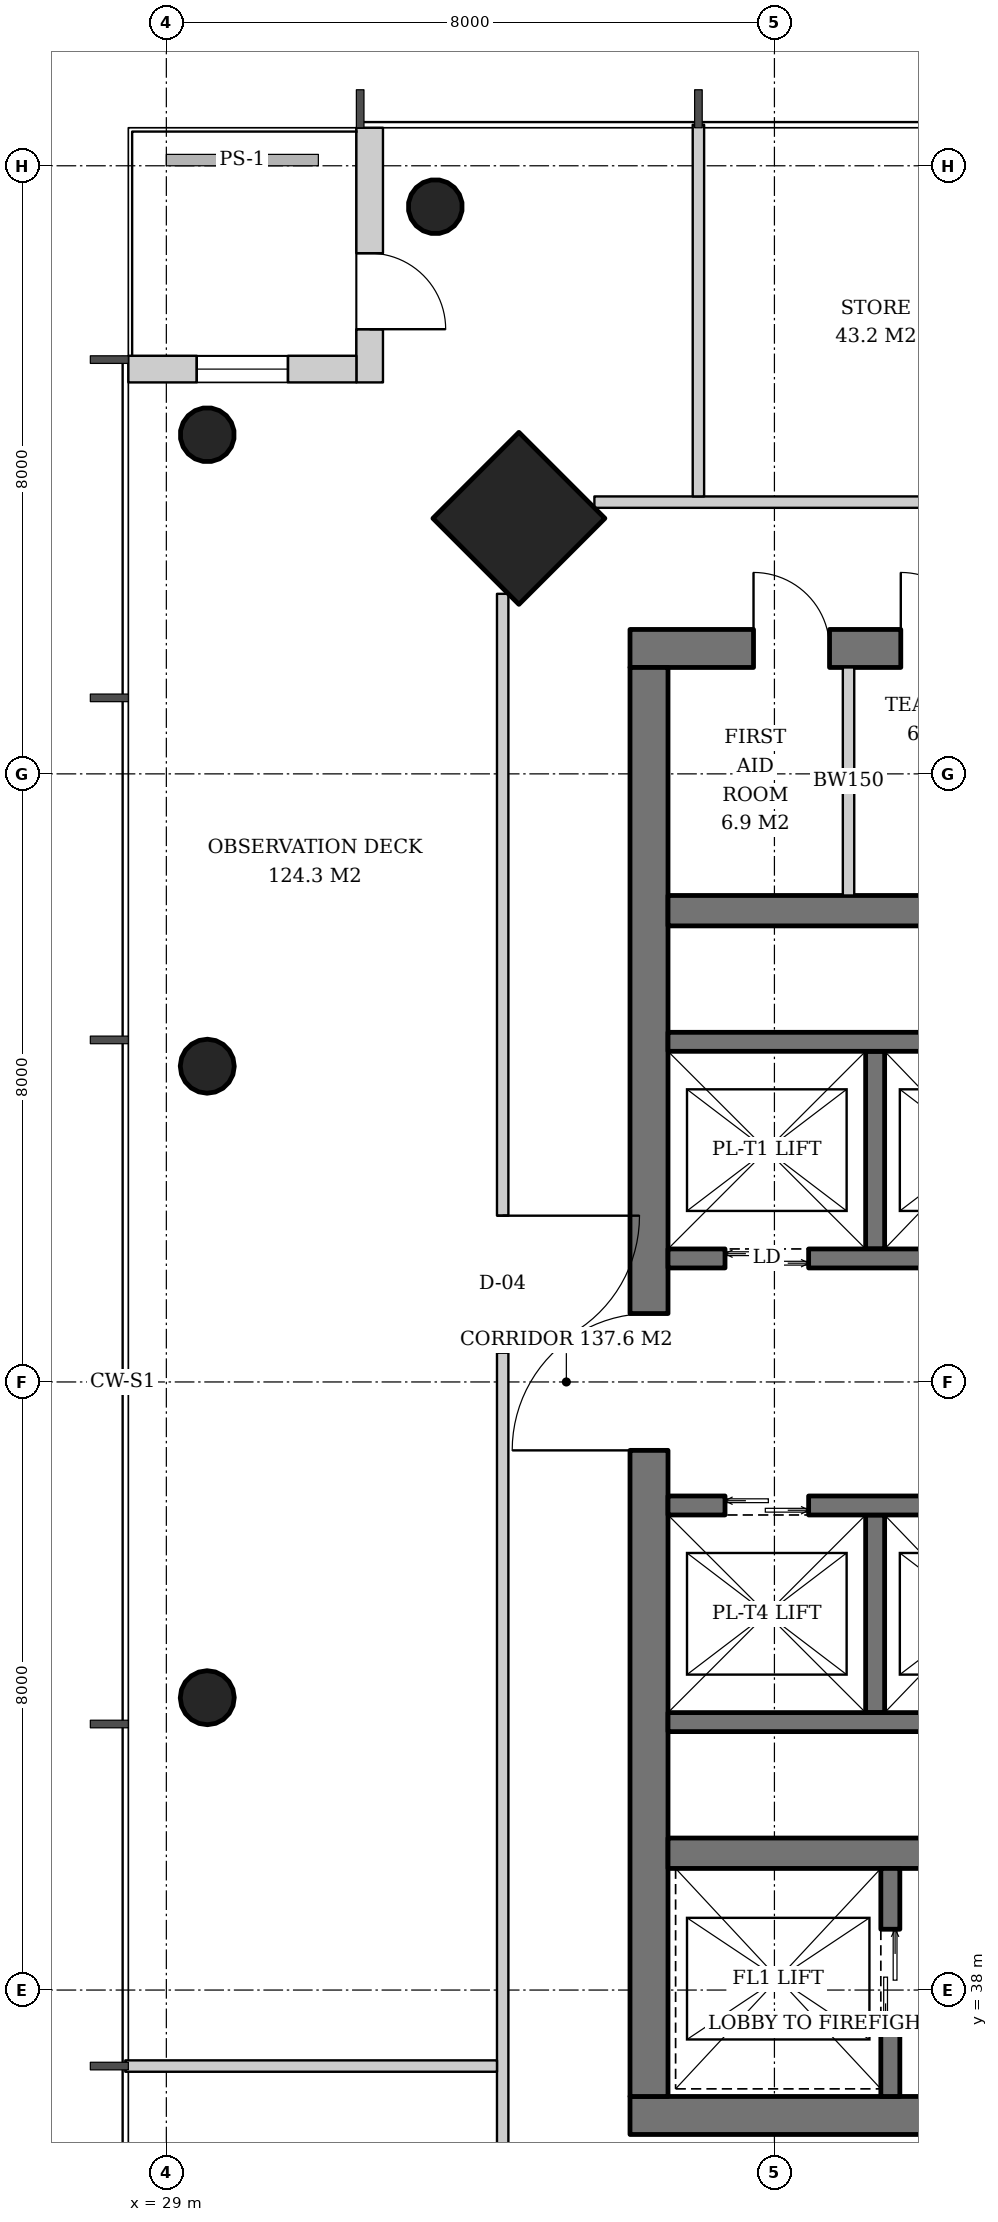
"""IFC4 building model, lengths in metres.
Left out: names, types, materials, properties, quantities, classifications, styles, units other than length and angle.
Written with IfcOpenShell. Run it as: python <this file> out.ifc"""

import sys

from ifc_helpers import new_model, si_unit, direction, frame, frame_2d, origin, origin_2d, place, context, subcontext, project, spatial, rectangle, hollow_circle, extrude, element, fill, save


model = new_model("IFC4")
c1 = context("Model", 3, precision=1e-05, world=origin(), true_north=direction((0.0, 1.0)))
c2 = subcontext(c1, "Body", "Model", "MODEL_VIEW")
j1 = project(units=[si_unit("LENGTHUNIT", "METRE"), si_unit("PLANEANGLEUNIT", "RADIAN")], contexts=[c1])
p1 = place(None, origin())
s1 = spatial("IfcSite", under=j1, at=p1, CompositionType="ELEMENT")
p2 = place(p1, origin())
s2 = spatial("IfcBuilding", under=s1, at=p2, CompositionType="ELEMENT")
p3 = place(p2, frame((0.0, 0.0, 287.0)))
s3 = spatial("IfcBuildingStorey", under=s2, at=p3, CompositionType="ELEMENT", Elevation=287.0)
p4 = place(p3, frame((33.6, 57.4, 0.0), z_axis=(0.031898107953, -0.031898107953, 0.998981992539), x_axis=(0.707106781187, 0.707106781187, 0.0)))
e1 = element("IfcColumn", 1, at=p4, inside=s3, PredefinedType="COLUMN", context=c2, shape_type="SweptSolid", body=[
    extrude(rectangle(XDim=1.6, YDim=1.6, at=origin_2d()), origin(), (0.0, 0.0, 1.0), 3.804),
])
for number, where, z_axis, x_axis in (
    (2, (32.5, 61.5, 0.0), (0.032, -0.032, 0.999), (0.707, 0.707, 0.0)),
    (3, (29.5, 58.5, 0.0), (0.032, -0.032, 0.999), (0.707, 0.707, 0.0)),
):
    element("IfcColumn", number, at=place(p3, frame(where, z_axis=z_axis, x_axis=x_axis)), inside=s3, PredefinedType="COLUMN", context=c2, shape_type="SweptSolid", body=[
        extrude(hollow_circle(Radius=0.355, WallThickness=0.025, at=origin_2d()), origin(), (0.0, 0.0, 1.0), 3.804),
    ])
for number, where, z_axis, x_axis in (
    (4, (29.5, 50.167, 0.0), (0.032, -0.011, 0.999), (0.317, 0.948, 0.0)),
    (5, (29.5, 41.833, 0.0), (0.032, 0.011, 0.999), (-0.317, 0.948, 0.0)),
):
    element("IfcColumn", number, at=place(p3, frame(where, z_axis=z_axis, x_axis=x_axis)), inside=s3, PredefinedType="COLUMN", context=c2, shape_type="SweptSolid", body=[
        extrude(hollow_circle(Radius=0.355, WallThickness=0.025, at=origin_2d()), origin(), (0.0, 0.0, 1.0), 3.802),
    ])
p5 = place(p3, frame((35.1, 36.35, 0.0), z_axis=(0.0, 0.0, 1.0), x_axis=(1.0, 0.0, 0.0)))
e6 = element("IfcWall", 6, at=p5, inside=s3, PredefinedType="SHEAR", context=c2, shape_type="SweptSolid", body=[
    extrude(rectangle(XDim=19.8, YDim=0.5, at=frame_2d((9.9, 0.0))), origin(), (0.0, 0.0, 1.0), 3.8),
])
p6 = place(p5, frame((3.9, 0.0, 0.0)))
e7 = element("IfcOpeningElement", 7, at=p6, cuts=e6, PredefinedType="OPENING", context=c2, shape_type="SweptSolid", body=[
    extrude(rectangle(XDim=1.0, YDim=2.1, at=frame_2d((0.5, 1.05))), frame((0.0, 0.26, 0.0), z_axis=(0.0, -1.0, 0.0), x_axis=(1.0, 0.0, 0.0)), (0.0, 0.0, 1.0), 0.52),
])
p7 = place(p5, frame((15.35, 0.0, 0.0)))
e8 = element("IfcOpeningElement", 8, at=p7, cuts=e6, PredefinedType="OPENING", context=c2, shape_type="SweptSolid", body=[
    extrude(rectangle(XDim=1.0, YDim=2.1, at=frame_2d((0.5, 1.05))), frame((0.0, 0.26, 0.0), z_axis=(0.0, -1.0, 0.0), x_axis=(1.0, 0.0, 0.0)), (0.0, 0.0, 1.0), 0.52),
])
p8 = place(p3, frame((35.1, 55.65, 0.0), z_axis=(0.0, 0.0, 1.0), x_axis=(1.0, 0.0, 0.0)))
e9 = element("IfcWall", 9, at=p8, inside=s3, PredefinedType="SHEAR", context=c2, shape_type="SweptSolid", body=[
    extrude(rectangle(XDim=19.8, YDim=0.5, at=frame_2d((9.9, 0.0))), origin(), (0.0, 0.0, 1.0), 3.8),
])
p9 = place(p8, frame((14.54, 0.0, 0.0)))
e10 = element("IfcOpeningElement", 10, at=p9, cuts=e9, PredefinedType="OPENING", context=c2, shape_type="SweptSolid", body=[
    extrude(rectangle(XDim=1.0, YDim=2.1, at=frame_2d((0.5, 1.05))), frame((0.0, 0.26, 0.0), z_axis=(0.0, -1.0, 0.0), x_axis=(1.0, 0.0, 0.0)), (0.0, 0.0, 1.0), 0.52),
])
p10 = place(p8, frame((1.625, 0.0, 0.0)))
e11 = element("IfcOpeningElement", 11, at=p10, cuts=e9, PredefinedType="OPENING", context=c2, shape_type="SweptSolid", body=[
    extrude(rectangle(XDim=1.0, YDim=2.1, at=frame_2d((0.5, 1.05))), frame((0.0, 0.26, 0.0), z_axis=(0.0, -1.0, 0.0), x_axis=(1.0, 0.0, 0.0)), (0.0, 0.0, 1.0), 0.52),
])
p11 = place(p8, frame((3.562, 0.0, 0.0)))
e12 = element("IfcOpeningElement", 12, at=p11, cuts=e9, PredefinedType="OPENING", context=c2, shape_type="SweptSolid", body=[
    extrude(rectangle(XDim=1.0, YDim=2.1, at=frame_2d((0.5, 1.05))), frame((0.0, 0.26, 0.0), z_axis=(0.0, -1.0, 0.0), x_axis=(1.0, 0.0, 0.0)), (0.0, 0.0, 1.0), 0.52),
])
p12 = place(p3, frame((35.35, 36.6, 0.0), z_axis=(0.0, 0.0, 1.0), x_axis=(0.0, 1.0, 0.0)))
e13 = element("IfcWall", 13, at=p12, inside=s3, PredefinedType="SHEAR", context=c2, shape_type="SweptSolid", body=[
    extrude(rectangle(XDim=18.8, YDim=0.5, at=frame_2d((9.4, 0.0))), origin(), (0.0, 0.0, 1.0), 3.8),
])
p13 = place(p12, frame((8.5, 0.0, 0.0)))
e14 = element("IfcOpeningElement", 14, at=p13, cuts=e13, PredefinedType="OPENING", context=c2, shape_type="SweptSolid", body=[
    extrude(rectangle(XDim=1.8, YDim=2.4, at=frame_2d((0.9, 1.2))), frame((0.0, 0.26, 0.0), z_axis=(0.0, -1.0, 0.0), x_axis=(1.0, 0.0, 0.0)), (0.0, 0.0, 1.0), 0.52),
])
for number, where, z_axis, x_axis in (
    (15, (35.6, 39.8, 0.0), (0.0, 0.0, 1.0), (1.0, 0.0, 0.0)),
    (16, (35.6, 52.2, 0.0), (0.0, 0.0, 1.0), (1.0, 0.0, 0.0)),
):
    element("IfcWall", number, at=place(p3, frame(where, z_axis=z_axis, x_axis=x_axis)), inside=s3, PredefinedType="SHEAR", context=c2, shape_type="SweptSolid", body=[
        extrude(rectangle(XDim=18.8, YDim=0.4, at=frame_2d((9.4, 0.0))), origin(), (0.0, 0.0, 1.0), 3.8),
    ])
p14 = place(p3, frame((31.675, 62.5, 0.0), z_axis=(0.0, 0.0, 1.0), x_axis=(0.0, -1.0, 0.0)))
e17 = element("IfcWall", 17, at=p14, inside=s3, PredefinedType="SOLIDWALL", context=c2, shape_type="SweptSolid", body=[
    extrude(rectangle(XDim=3.35, YDim=0.35, at=frame_2d((1.675, 0.0))), origin(), (0.0, 0.0, 1.0), 3.55),
])
p15 = place(p14, frame((1.65, 0.0, 0.0)))
e18 = element("IfcOpeningElement", 18, at=p15, cuts=e17, PredefinedType="OPENING", context=c2, shape_type="SweptSolid", body=[
    extrude(rectangle(XDim=1.0, YDim=2.4, at=frame_2d((0.5, 1.2))), frame((0.0, 0.185, 0.0), z_axis=(0.0, -1.0, 0.0), x_axis=(1.0, 0.0, 0.0)), (0.0, 0.0, 1.0), 0.37),
])
p16 = place(p3, frame((31.5, 59.325, 0.0), z_axis=(0.0, 0.0, 1.0), x_axis=(-1.0, 0.0, 0.0)))
e19 = element("IfcWall", 19, at=p16, inside=s3, PredefinedType="SOLIDWALL", context=c2, shape_type="SweptSolid", body=[
    extrude(rectangle(XDim=3.0, YDim=0.35, at=frame_2d((1.5, 0.0))), origin(), (0.0, 0.0, 1.0), 3.55),
])
p17 = place(p16, frame((0.9, 0.0, 0.6)))
e20 = element("IfcOpeningElement", 20, at=p17, cuts=e19, PredefinedType="OPENING", context=c2, shape_type="SweptSolid", body=[
    extrude(rectangle(XDim=1.2, YDim=2.55, at=frame_2d((0.6, 1.275))), frame((0.0, 0.185, 0.0), z_axis=(0.0, -1.0, 0.0), x_axis=(1.0, 0.0, 0.0)), (0.0, 0.0, 1.0), 0.37),
])
p18 = place(p3, frame((38.525, 36.6, 0.0), z_axis=(0.0, 0.0, 1.0), x_axis=(0.0, 1.0, 0.0)))
e21 = element("IfcWall", 21, at=p18, inside=s3, PredefinedType="SHEAR", context=c2, shape_type="SweptSolid", body=[
    extrude(rectangle(XDim=3.0, YDim=0.25, at=frame_2d((1.5, 0.0))), origin(), (0.0, 0.0, 1.0), 3.8),
])
p19 = place(p18, frame((0.9, 0.0, 0.0)))
e22 = element("IfcOpeningElement", 22, at=p19, cuts=e21, PredefinedType="OPENING", context=c2, shape_type="SweptSolid", body=[
    extrude(rectangle(XDim=1.3, YDim=2.2, at=frame_2d((0.65, 1.1))), frame((0.0, 0.135, 0.0), z_axis=(0.0, -1.0, 0.0), x_axis=(1.0, 0.0, 0.0)), (0.0, 0.0, 1.0), 0.27),
])
p20 = place(p3, frame((38.325, 47.75, 0.0), z_axis=(0.0, 0.0, 1.0), x_axis=(0.0, 1.0, 0.0)))
e23 = element("IfcWall", 23, at=p20, inside=s3, PredefinedType="SHEAR", context=c2, shape_type="SweptSolid", body=[
    extrude(rectangle(XDim=2.6, YDim=0.25, at=frame_2d((1.3, 0.0))), origin(), (0.0, 0.0, 1.0), 3.8),
])
p21 = place(p3, frame((35.6, 50.475, 0.0), z_axis=(0.0, 0.0, 1.0), x_axis=(1.0, 0.0, 0.0)))
e24 = element("IfcWall", 24, at=p21, inside=s3, PredefinedType="SHEAR", context=c2, shape_type="SweptSolid", body=[
    extrude(rectangle(XDim=11.1, YDim=0.25, at=frame_2d((5.55, 0.0))), origin(), (0.0, 0.0, 1.0), 3.8),
])
p22 = place(p3, frame((35.6, 47.625, 0.0), z_axis=(0.0, 0.0, 1.0), x_axis=(1.0, 0.0, 0.0)))
e25 = element("IfcWall", 25, at=p22, inside=s3, PredefinedType="SHEAR", context=c2, shape_type="SweptSolid", body=[
    extrude(rectangle(XDim=12.93, YDim=0.25, at=frame_2d((6.465, 0.0))), origin(), (0.0, 0.0, 1.0), 3.8),
])
p23 = place(p22, frame((0.75, 0.0, 0.0)))
e26 = element("IfcOpeningElement", 26, at=p23, cuts=e25, PredefinedType="OPENING", context=c2, shape_type="SweptSolid", body=[
    extrude(rectangle(XDim=1.1, YDim=2.2, at=frame_2d((0.55, 1.1))), frame((0.0, 0.135, 0.0), z_axis=(0.0, -1.0, 0.0), x_axis=(1.0, 0.0, 0.0)), (0.0, 0.0, 1.0), 0.27),
])
p24 = place(p22, frame((3.55, 0.0, 0.0)))
e27 = element("IfcOpeningElement", 27, at=p24, cuts=e25, PredefinedType="OPENING", context=c2, shape_type="SweptSolid", body=[
    extrude(rectangle(XDim=1.1, YDim=2.2, at=frame_2d((0.55, 1.1))), frame((0.0, 0.135, 0.0), z_axis=(0.0, -1.0, 0.0), x_axis=(1.0, 0.0, 0.0)), (0.0, 0.0, 1.0), 0.27),
])
p25 = place(p22, frame((6.3, 0.0, 0.0)))
e28 = element("IfcOpeningElement", 28, at=p25, cuts=e25, PredefinedType="OPENING", context=c2, shape_type="SweptSolid", body=[
    extrude(rectangle(XDim=1.1, YDim=2.2, at=frame_2d((0.55, 1.1))), frame((0.0, 0.135, 0.0), z_axis=(0.0, -1.0, 0.0), x_axis=(1.0, 0.0, 0.0)), (0.0, 0.0, 1.0), 0.27),
])
p26 = place(p22, frame((9.1, 0.0, 0.0)))
e29 = element("IfcOpeningElement", 29, at=p26, cuts=e25, PredefinedType="OPENING", context=c2, shape_type="SweptSolid", body=[
    extrude(rectangle(XDim=1.0, YDim=2.1, at=frame_2d((0.5, 1.05))), frame((0.0, 0.135, 0.0), z_axis=(0.0, -1.0, 0.0), x_axis=(1.0, 0.0, 0.0)), (0.0, 0.0, 1.0), 0.27),
])
p27 = place(p22, frame((11.615, 0.0, 0.0)))
e30 = element("IfcOpeningElement", 30, at=p27, cuts=e25, PredefinedType="OPENING", context=c2, shape_type="SweptSolid", body=[
    extrude(rectangle(XDim=0.8, YDim=2.0, at=frame_2d((0.4, 1.0))), frame((0.0, 0.135, 0.0), z_axis=(0.0, -1.0, 0.0), x_axis=(1.0, 0.0, 0.0)), (0.0, 0.0, 1.0), 0.27),
])
p28 = place(p3, frame((38.325, 44.25, 0.0), z_axis=(0.0, 0.0, 1.0), x_axis=(0.0, -1.0, 0.0)))
e31 = element("IfcWall", 31, at=p28, inside=s3, PredefinedType="SHEAR", context=c2, shape_type="SweptSolid", body=[
    extrude(rectangle(XDim=2.6, YDim=0.25, at=frame_2d((1.3, 0.0))), origin(), (0.0, 0.0, 1.0), 3.8),
])
p29 = place(p3, frame((35.6, 41.525, 0.0), z_axis=(0.0, 0.0, 1.0), x_axis=(1.0, 0.0, 0.0)))
e32 = element("IfcWall", 32, at=p29, inside=s3, PredefinedType="SHEAR", context=c2, shape_type="SweptSolid", body=[
    extrude(rectangle(XDim=11.1, YDim=0.25, at=frame_2d((5.55, 0.0))), origin(), (0.0, 0.0, 1.0), 3.8),
])
p30 = place(p3, frame((35.6, 44.375, 0.0), z_axis=(0.0, 0.0, 1.0), x_axis=(1.0, 0.0, 0.0)))
e33 = element("IfcWall", 33, at=p30, inside=s3, PredefinedType="SHEAR", context=c2, shape_type="SweptSolid", body=[
    extrude(rectangle(XDim=12.93, YDim=0.25, at=frame_2d((6.465, 0.0))), origin(), (0.0, 0.0, 1.0), 3.8),
])
p31 = place(p30, frame((0.75, 0.0, 0.0)))
e34 = element("IfcOpeningElement", 34, at=p31, cuts=e33, PredefinedType="OPENING", context=c2, shape_type="SweptSolid", body=[
    extrude(rectangle(XDim=1.1, YDim=2.2, at=frame_2d((0.55, 1.1))), frame((0.0, 0.135, 0.0), z_axis=(0.0, -1.0, 0.0), x_axis=(1.0, 0.0, 0.0)), (0.0, 0.0, 1.0), 0.27),
])
p32 = place(p30, frame((3.55, 0.0, 0.0)))
e35 = element("IfcOpeningElement", 35, at=p32, cuts=e33, PredefinedType="OPENING", context=c2, shape_type="SweptSolid", body=[
    extrude(rectangle(XDim=1.1, YDim=2.2, at=frame_2d((0.55, 1.1))), frame((0.0, 0.135, 0.0), z_axis=(0.0, -1.0, 0.0), x_axis=(1.0, 0.0, 0.0)), (0.0, 0.0, 1.0), 0.27),
])
p33 = place(p30, frame((6.3, 0.0, 0.0)))
e36 = element("IfcOpeningElement", 36, at=p33, cuts=e33, PredefinedType="OPENING", context=c2, shape_type="SweptSolid", body=[
    extrude(rectangle(XDim=1.1, YDim=2.2, at=frame_2d((0.55, 1.1))), frame((0.0, 0.135, 0.0), z_axis=(0.0, -1.0, 0.0), x_axis=(1.0, 0.0, 0.0)), (0.0, 0.0, 1.0), 0.27),
])
p34 = place(p30, frame((9.1, 0.0, 0.0)))
e37 = element("IfcOpeningElement", 37, at=p34, cuts=e33, PredefinedType="OPENING", context=c2, shape_type="SweptSolid", body=[
    extrude(rectangle(XDim=1.0, YDim=2.1, at=frame_2d((0.5, 1.05))), frame((0.0, 0.135, 0.0), z_axis=(0.0, -1.0, 0.0), x_axis=(1.0, 0.0, 0.0)), (0.0, 0.0, 1.0), 0.27),
])
p35 = place(p30, frame((11.615, 0.0, 0.0)))
e38 = element("IfcOpeningElement", 38, at=p35, cuts=e33, PredefinedType="OPENING", context=c2, shape_type="SweptSolid", body=[
    extrude(rectangle(XDim=0.8, YDim=2.0, at=frame_2d((0.4, 1.0))), frame((0.0, 0.135, 0.0), z_axis=(0.0, -1.0, 0.0), x_axis=(1.0, 0.0, 0.0)), (0.0, 0.0, 1.0), 0.27),
])
p36 = place(p3, frame((37.975, 52.4, 0.0), z_axis=(0.0, 0.0, 1.0), x_axis=(0.0, 1.0, 0.0)))
e39 = element("IfcWall", 39, at=p36, inside=s3, PredefinedType="SOLIDWALL", context=c2, shape_type="SweptSolid", body=[
    extrude(rectangle(XDim=3.0, YDim=0.15, at=frame_2d((1.5, 0.0))), origin(), (0.0, 0.0, 1.0), 3.55),
])
p37 = place(p3, frame((55.369, 57.575, 0.0), z_axis=(0.0, 0.0, 1.0), x_axis=(-1.0, 0.0, 0.0)))
e40 = element("IfcWall", 40, at=p37, inside=s3, PredefinedType="PARTITIONING", context=c2, shape_type="SweptSolid", body=[
    extrude(rectangle(XDim=20.737, YDim=0.15, at=frame_2d((10.369, 0.0))), origin(), (0.0, 0.0, 1.0), 2.95),
])
p38 = place(p37, frame((4.081, 0.0, 0.0)))
e41 = element("IfcOpeningElement", 41, at=p38, cuts=e40, PredefinedType="OPENING", context=c2, shape_type="SweptSolid", body=[
    extrude(rectangle(XDim=1.0, YDim=2.1, at=frame_2d((0.5, 1.05))), frame((0.0, 0.085, 0.0), z_axis=(0.0, -1.0, 0.0), x_axis=(1.0, 0.0, 0.0)), (0.0, 0.0, 1.0), 0.17),
])
p39 = place(p37, frame((14.369, 0.0, 0.0)))
e42 = element("IfcOpeningElement", 42, at=p39, cuts=e40, PredefinedType="OPENING", context=c2, shape_type="SweptSolid", body=[
    extrude(rectangle(XDim=1.0, YDim=2.1, at=frame_2d((0.5, 1.05))), frame((0.0, 0.085, 0.0), z_axis=(0.0, -1.0, 0.0), x_axis=(1.0, 0.0, 0.0)), (0.0, 0.0, 1.0), 0.17),
])
p40 = place(p3, frame((36.0, 57.65, 0.0), z_axis=(0.0, 0.0, 1.0), x_axis=(0.0, 1.0, 0.0)))
e43 = element("IfcWall", 43, at=p40, inside=s3, PredefinedType="PARTITIONING", context=c2, shape_type="SweptSolid", body=[
    extrude(rectangle(XDim=4.89, YDim=0.15, at=frame_2d((2.445, 0.0))), origin(), (0.0, 0.0, 1.0), 3.05),
])
p41 = place(p3, frame((33.425, 56.369, 0.0), z_axis=(0.0, 0.0, 1.0), x_axis=(0.0, -1.0, 0.0)))
e44 = element("IfcWall", 44, at=p41, inside=s3, PredefinedType="PARTITIONING", context=c2, shape_type="SweptSolid", body=[
    extrude(rectangle(XDim=20.737, YDim=0.15, at=frame_2d((10.369, 0.0))), origin(), (0.0, 0.0, 1.0), 2.95),
])
p42 = place(p41, frame((8.181, 0.0, 0.0)))
e45 = element("IfcOpeningElement", 45, at=p42, cuts=e44, PredefinedType="OPENING", context=c2, shape_type="SweptSolid", body=[
    extrude(rectangle(XDim=1.8, YDim=2.4, at=frame_2d((0.9, 1.2))), frame((0.0, 0.085, 0.0), z_axis=(0.0, -1.0, 0.0), x_axis=(1.0, 0.0, 0.0)), (0.0, 0.0, 1.0), 0.17),
])
p43 = place(p3, frame((33.35, 37.0, 0.0), z_axis=(0.0, 0.0, 1.0), x_axis=(-1.0, 0.0, 0.0)))
e46 = element("IfcWall", 46, at=p43, inside=s3, PredefinedType="PARTITIONING", context=c2, shape_type="SweptSolid", body=[
    extrude(rectangle(XDim=4.89, YDim=0.15, at=frame_2d((2.445, 0.0))), origin(), (0.0, 0.0, 1.0), 3.05),
])
p44 = place(p15, origin())
e47 = element("IfcDoor", 47, at=p44, inside=s3, OperationType="SINGLE_SWING_RIGHT", PredefinedType="DOOR", context=c2, shape_type="SweptSolid", body=[
    extrude(rectangle(XDim=1.0, YDim=2.4, at=frame_2d((0.5, 1.2))), frame((0.0, 0.025, 0.0), z_axis=(0.0, -1.0, 0.0), x_axis=(1.0, 0.0, 0.0)), (0.0, 0.0, 1.0), 0.05),
])
fill(e18, e47)
p45 = place(p17, origin())
e48 = element("IfcWindow", 48, at=p45, inside=s3, PartitioningType="SINGLE_PANEL", PredefinedType="WINDOW", context=c2, shape_type="SweptSolid", body=[
    extrude(rectangle(XDim=1.2, YDim=2.55, at=frame_2d((0.6, 1.275))), frame((0.0, 0.03, 0.0), z_axis=(0.0, -1.0, 0.0), x_axis=(1.0, 0.0, 0.0)), (0.0, 0.0, 1.0), 0.06),
])
fill(e20, e48)
p46 = place(p19, origin())
e49 = element("IfcDoor", 49, at=p46, inside=s3, OperationType="DOUBLE_DOOR_SLIDING", PredefinedType="DOOR", context=c2, shape_type="SweptSolid", body=[
    extrude(rectangle(XDim=1.3, YDim=2.2, at=frame_2d((0.65, 1.1))), frame((0.0, 0.025, 0.0), z_axis=(0.0, -1.0, 0.0), x_axis=(1.0, 0.0, 0.0)), (0.0, 0.0, 1.0), 0.05),
])
fill(e22, e49)
p47 = place(p23, origin())
e50 = element("IfcDoor", 50, at=p47, inside=s3, OperationType="DOUBLE_DOOR_SLIDING", PredefinedType="DOOR", context=c2, shape_type="SweptSolid", body=[
    extrude(rectangle(XDim=1.1, YDim=2.2, at=frame_2d((0.55, 1.1))), frame((0.0, 0.025, 0.0), z_axis=(0.0, -1.0, 0.0), x_axis=(1.0, 0.0, 0.0)), (0.0, 0.0, 1.0), 0.05),
])
fill(e26, e50)
p48 = place(p31, origin())
e51 = element("IfcDoor", 51, at=p48, inside=s3, OperationType="DOUBLE_DOOR_SLIDING", PredefinedType="DOOR", context=c2, shape_type="SweptSolid", body=[
    extrude(rectangle(XDim=1.1, YDim=2.2, at=frame_2d((0.55, 1.1))), frame((0.0, 0.025, 0.0), z_axis=(0.0, -1.0, 0.0), x_axis=(1.0, 0.0, 0.0)), (0.0, 0.0, 1.0), 0.05),
])
fill(e34, e51)
p49 = place(p13, origin())
e52 = element("IfcDoor", 52, at=p49, inside=s3, OperationType="DOUBLE_DOOR_SINGLE_SWING", PredefinedType="DOOR", context=c2, shape_type="SweptSolid", body=[
    extrude(rectangle(XDim=1.8, YDim=2.4, at=frame_2d((0.9, 1.2))), frame((0.0, 0.025, 0.0), z_axis=(0.0, -1.0, 0.0), x_axis=(1.0, 0.0, 0.0)), (0.0, 0.0, 1.0), 0.05),
])
fill(e14, e52)
p50 = place(p10, origin())
e53 = element("IfcDoor", 53, at=p50, inside=s3, OperationType="SINGLE_SWING_LEFT", PredefinedType="DOOR", context=c2, shape_type="SweptSolid", body=[
    extrude(rectangle(XDim=1.0, YDim=2.1, at=frame_2d((0.5, 1.05))), frame((0.0, -0.19, 0.0), z_axis=(0.0, -1.0, 0.0), x_axis=(1.0, 0.0, 0.0)), (0.0, 0.0, 1.0), 0.05),
])
fill(e11, e53)
p51 = place(p11, origin())
e54 = element("IfcDoor", 54, at=p51, inside=s3, OperationType="SINGLE_SWING_LEFT", PredefinedType="DOOR", context=c2, shape_type="SweptSolid", body=[
    extrude(rectangle(XDim=1.0, YDim=2.1, at=frame_2d((0.5, 1.05))), frame((0.0, -0.19, 0.0), z_axis=(0.0, -1.0, 0.0), x_axis=(1.0, 0.0, 0.0)), (0.0, 0.0, 1.0), 0.05),
])
fill(e12, e54)
p52 = place(p42, origin())
e55 = element("IfcDoor", 55, at=p52, inside=s3, OperationType="DOUBLE_DOOR_SINGLE_SWING", PredefinedType="DOOR", context=c2, shape_type="SweptSolid", body=[
    extrude(rectangle(XDim=1.8, YDim=2.4, at=frame_2d((0.9, 1.2))), frame((0.0, 0.025, 0.0), z_axis=(0.0, -1.0, 0.0), x_axis=(1.0, 0.0, 0.0)), (0.0, 0.0, 1.0), 0.05),
])
fill(e45, e55)
save(model, sys.argv[1])
